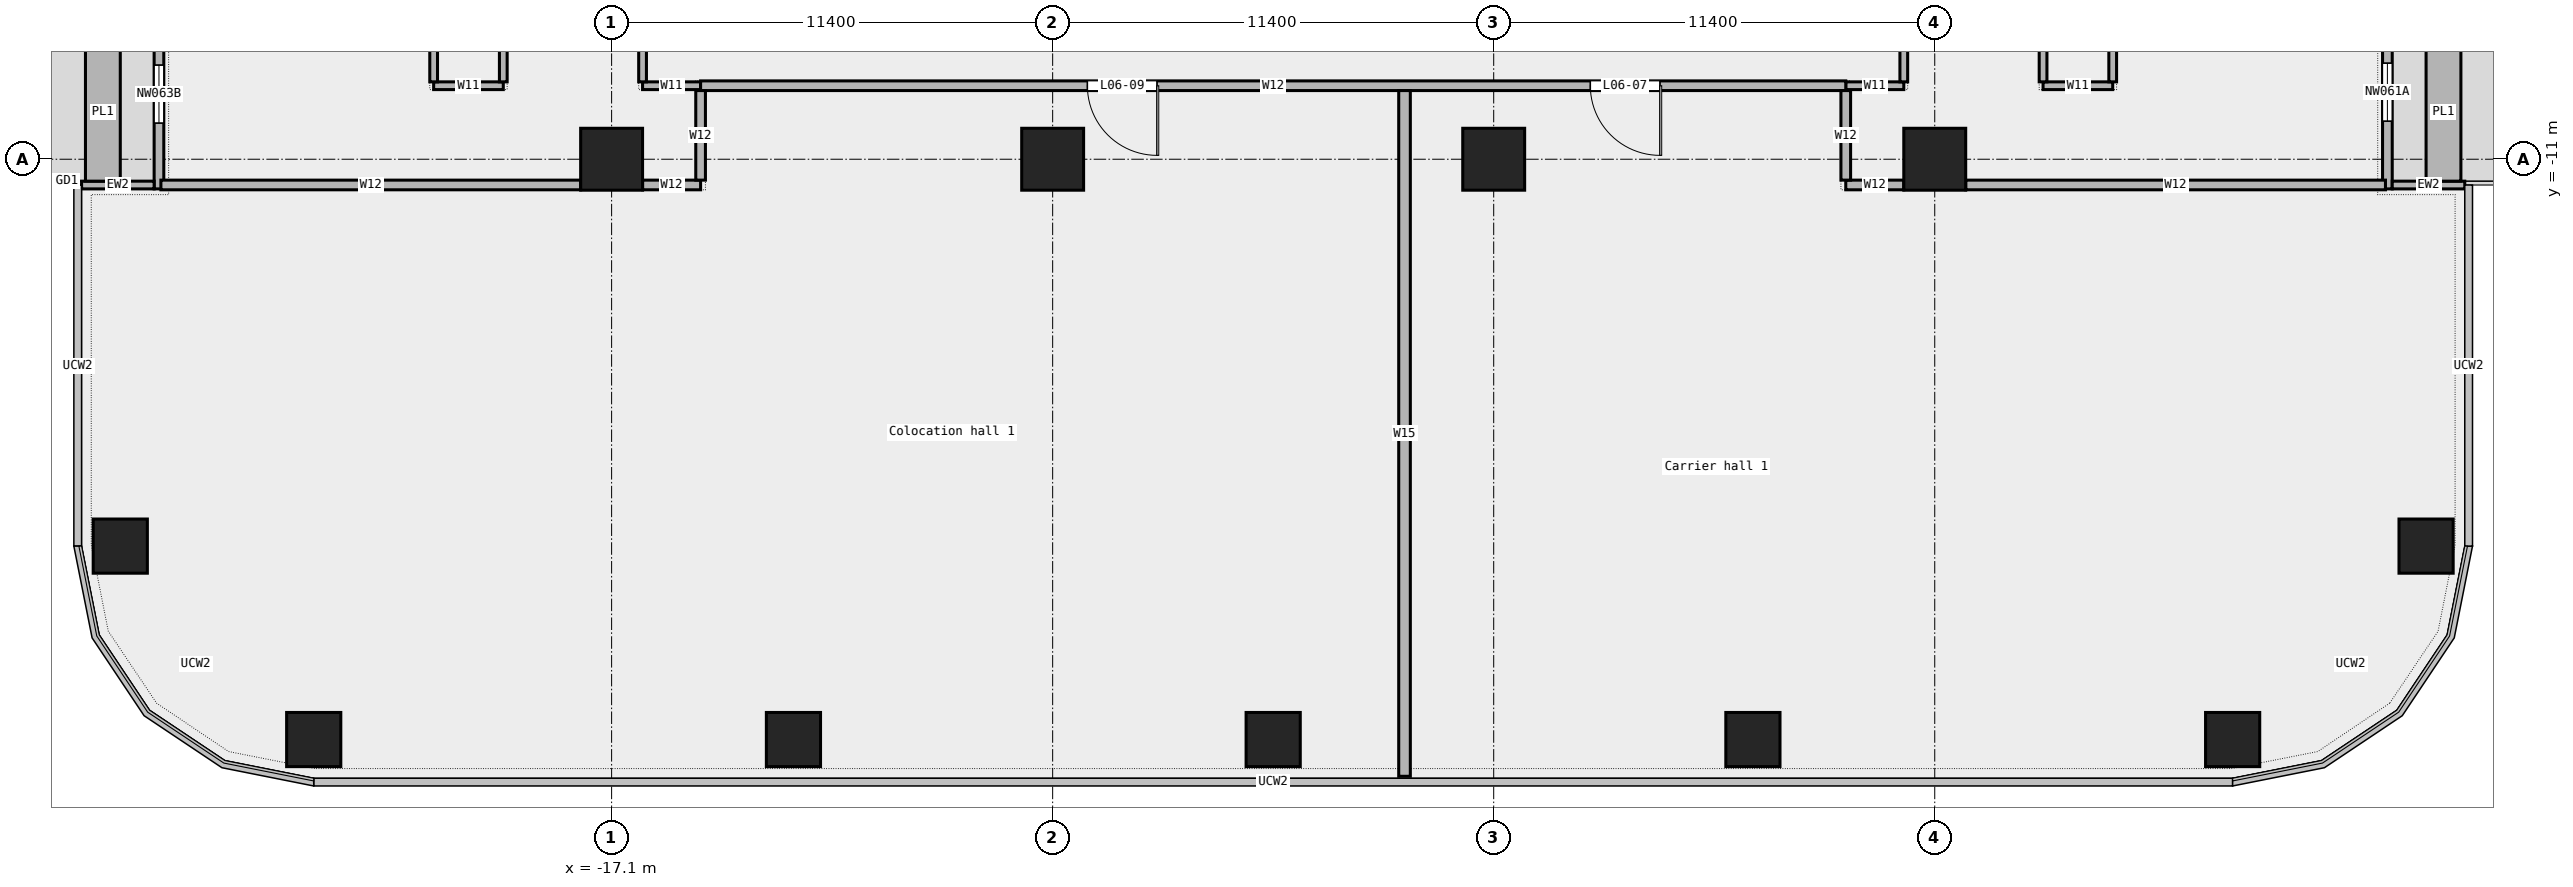
"""IFC4 building model, lengths in metres.
Left out: names, types, materials, properties, quantities, classifications, styles, units other than length and angle.
Written with IfcOpenShell. Run it as: python <this file> out.ifc"""

import sys

from ifc_helpers import new_model, si_unit, direction, frame, frame_2d, origin, origin_2d, place, context, subcontext, project, spatial, rectangle, extrude, element, fill, save


model = new_model("IFC4")
c1 = context("Model", 3, precision=1e-05, world=origin(), true_north=direction((0.0, 1.0)))
c2 = subcontext(c1, "Body", "Model", "MODEL_VIEW")
j1 = project(units=[si_unit("LENGTHUNIT", "METRE"), si_unit("PLANEANGLEUNIT", "RADIAN")], contexts=[c1])
p1 = place(None, origin())
s1 = spatial("IfcSite", under=j1, at=p1, CompositionType="ELEMENT")
p2 = place(p1, origin())
s2 = spatial("IfcBuilding", under=s1, at=p2, CompositionType="ELEMENT")
p3 = place(p2, frame((0.0, 0.0, 35.8)))
s3 = spatial("IfcBuildingStorey", under=s2, at=p3, CompositionType="ELEMENT", Elevation=35.8)
for number, where, z_axis, x_axis in (
    (1, (-24.8, -26.0, 0.0), (0.0, 0.0, 1.0), (1.0, 0.0, 0.0)),
    (2, (-12.4, -26.0, 0.0), (0.0, 0.0, 1.0), (1.0, 0.0, 0.0)),
    (3, (0.0, -26.0, 0.0), (0.0, 0.0, 1.0), (1.0, 0.0, 0.0)),
    (4, (12.4, -26.0, 0.0), (0.0, 0.0, 1.0), (1.0, 0.0, 0.0)),
    (5, (24.8, -26.0, 0.0), (0.0, 0.0, 1.0), (1.0, 0.0, 0.0)),
    (6, (29.8, -21.0, 0.0), (0.0, 0.0, 1.0), (1.0, 0.0, 0.0)),
    (7, (-29.8, -21.0, 0.0), (0.0, 0.0, 1.0), (1.0, 0.0, 0.0)),
):
    element("IfcColumn", number, at=place(p3, frame(where, z_axis=z_axis, x_axis=x_axis)), inside=s3, PredefinedType="COLUMN", context=c2, shape_type="SweptSolid", body=[
        extrude(rectangle(XDim=1.4, YDim=1.4, at=origin_2d()), origin(), (0.0, 0.0, 1.0), 4.35),
    ])
for number, where, z_axis, x_axis in (
    (8, (-17.1, -11.0, 0.0), (0.0, 0.0, 1.0), (1.0, 0.0, 0.0)),
    (9, (-5.7, -11.0, 0.0), (0.0, 0.0, 1.0), (1.0, 0.0, 0.0)),
    (10, (5.7, -11.0, 0.0), (0.0, 0.0, 1.0), (1.0, 0.0, 0.0)),
    (11, (17.1, -11.0, 0.0), (0.0, 0.0, 1.0), (1.0, 0.0, 0.0)),
):
    element("IfcColumn", number, at=place(p3, frame(where, z_axis=z_axis, x_axis=x_axis)), inside=s3, PredefinedType="COLUMN", context=c2, shape_type="SweptSolid", body=[
        extrude(rectangle(XDim=1.6, YDim=1.6, at=origin_2d()), origin(), (0.0, 0.0, 1.0), 4.35),
    ])
p4 = place(p3, frame((28.8, -11.767, 0.0), z_axis=(0.0, 0.0, 1.0), x_axis=(0.0, 1.0, 0.0)))
e12 = element("IfcWall", 12, at=p4, inside=s3, PredefinedType="STANDARD", context=c2, shape_type="SweptSolid", body=[
    extrude(rectangle(XDim=14.2, YDim=0.25, at=frame_2d((7.1, 0.0))), origin(), (0.0, 0.0, 1.0), 4.35),
])
p5 = place(p4, frame((1.75, 0.0, 0.45)))
e13 = element("IfcOpeningElement", 13, at=p5, cuts=e12, PredefinedType="OPENING", context=c2, shape_type="SweptSolid", body=[
    extrude(rectangle(XDim=1.5, YDim=3.0, at=frame_2d((0.75, 1.5))), frame((0.0, 0.137, 0.0), z_axis=(0.0, -1.0, 0.0), x_axis=(1.0, 0.0, 0.0)), (0.0, 0.0, 1.0), 0.274),
])
p6 = place(p4, frame((6.25, 0.0, 0.0)))
e14 = element("IfcOpeningElement", 14, at=p6, cuts=e12, PredefinedType="OPENING", context=c2, shape_type="SweptSolid", body=[
    extrude(rectangle(XDim=1.8, YDim=2.4, at=frame_2d((0.9, 1.2))), frame((0.0, 0.137, 0.0), z_axis=(0.0, -1.0, 0.0), x_axis=(1.0, 0.0, 0.0)), (0.0, 0.0, 1.0), 0.274),
])
p7 = place(p4, frame((11.0, 0.0, 0.45)))
e15 = element("IfcOpeningElement", 15, at=p7, cuts=e12, PredefinedType="OPENING", context=c2, shape_type="SweptSolid", body=[
    extrude(rectangle(XDim=1.5, YDim=3.0, at=frame_2d((0.75, 1.5))), frame((0.0, 0.137, 0.0), z_axis=(0.0, -1.0, 0.0), x_axis=(1.0, 0.0, 0.0)), (0.0, 0.0, 1.0), 0.274),
])
p8 = place(p3, frame((30.8, -11.667, 0.0), z_axis=(0.0, 0.0, 1.0), x_axis=(-1.0, 0.0, 0.0)))
e16 = element("IfcWall", 16, at=p8, inside=s3, PredefinedType="STANDARD", context=c2, shape_type="SweptSolid", body=[
    extrude(rectangle(XDim=1.875, YDim=0.2, at=frame_2d((0.938, 0.0))), origin(), (0.0, 0.0, 1.0), 4.35),
])
p9 = place(p3, frame((30.25, -11.567, 0.0), z_axis=(0.0, 0.0, 1.0), x_axis=(0.0, 1.0, 0.0)))
e17 = element("IfcWall", 17, at=p9, inside=s3, PredefinedType="STANDARD", context=c2, shape_type="SweptSolid", body=[
    extrude(rectangle(XDim=3.6, YDim=0.9, at=frame_2d((1.8, 0.0))), origin(), (0.0, 0.0, 1.0), 0.7),
])
p10 = place(p3, frame((-28.8, 2.433, 0.0), z_axis=(0.0, 0.0, 1.0), x_axis=(0.0, -1.0, 0.0)))
e18 = element("IfcWall", 18, at=p10, inside=s3, PredefinedType="STANDARD", context=c2, shape_type="SweptSolid", body=[
    extrude(rectangle(XDim=14.2, YDim=0.25, at=frame_2d((7.1, 0.0))), origin(), (0.0, 0.0, 1.0), 4.35),
])
p11 = place(p10, frame((1.75, 0.0, 0.45)))
e19 = element("IfcOpeningElement", 19, at=p11, cuts=e18, PredefinedType="OPENING", context=c2, shape_type="SweptSolid", body=[
    extrude(rectangle(XDim=1.5, YDim=3.0, at=frame_2d((0.75, 1.5))), frame((0.0, 0.137, 0.0), z_axis=(0.0, -1.0, 0.0), x_axis=(1.0, 0.0, 0.0)), (0.0, 0.0, 1.0), 0.274),
])
p12 = place(p10, frame((6.25, 0.0, 0.0)))
e20 = element("IfcOpeningElement", 20, at=p12, cuts=e18, PredefinedType="OPENING", context=c2, shape_type="SweptSolid", body=[
    extrude(rectangle(XDim=1.8, YDim=2.4, at=frame_2d((0.9, 1.2))), frame((0.0, 0.137, 0.0), z_axis=(0.0, -1.0, 0.0), x_axis=(1.0, 0.0, 0.0)), (0.0, 0.0, 1.0), 0.274),
])
p13 = place(p10, frame((11.0, 0.0, 0.45)))
e21 = element("IfcOpeningElement", 21, at=p13, cuts=e18, PredefinedType="OPENING", context=c2, shape_type="SweptSolid", body=[
    extrude(rectangle(XDim=1.5, YDim=3.0, at=frame_2d((0.75, 1.5))), frame((0.0, 0.137, 0.0), z_axis=(0.0, -1.0, 0.0), x_axis=(1.0, 0.0, 0.0)), (0.0, 0.0, 1.0), 0.274),
])
p14 = place(p3, frame((-30.8, -11.667, 0.0), z_axis=(0.0, 0.0, 1.0), x_axis=(1.0, 0.0, 0.0)))
e22 = element("IfcWall", 22, at=p14, inside=s3, PredefinedType="STANDARD", context=c2, shape_type="SweptSolid", body=[
    extrude(rectangle(XDim=1.875, YDim=0.2, at=frame_2d((0.938, 0.0))), origin(), (0.0, 0.0, 1.0), 4.35),
])
p15 = place(p3, frame((-30.25, -7.967, 0.0), z_axis=(0.0, 0.0, 1.0), x_axis=(0.0, -1.0, 0.0)))
e23 = element("IfcWall", 23, at=p15, inside=s3, PredefinedType="STANDARD", context=c2, shape_type="SweptSolid", body=[
    extrude(rectangle(XDim=3.6, YDim=0.9, at=frame_2d((1.8, 0.0))), origin(), (0.0, 0.0, 1.0), 0.7),
])
p16 = place(p3, frame((-28.75, -11.665, 0.0), z_axis=(0.0, 0.0, 1.0), x_axis=(1.0, 0.0, 0.0)))
e24 = element("IfcWall", 24, at=p16, inside=s3, PredefinedType="PARTITIONING", context=c2, shape_type="SweptSolid", body=[
    extrude(rectangle(XDim=10.85, YDim=0.25, at=frame_2d((5.425, 0.0))), origin(), (0.0, 0.0, 1.0), 4.35),
])
for number, where, z_axis, x_axis in (
    (25, (-16.3, -11.665, 0.0), (0.0, 0.0, 1.0), (1.0, 0.0, 0.0)),
    (26, (14.8, -11.665, 0.0), (0.0, 0.0, 1.0), (1.0, 0.0, 0.0)),
):
    element("IfcWall", number, at=place(p3, frame(where, z_axis=z_axis, x_axis=x_axis)), inside=s3, PredefinedType="PARTITIONING", context=c2, shape_type="SweptSolid", body=[
        extrude(rectangle(XDim=1.5, YDim=0.25, at=frame_2d((0.75, 0.0))), origin(), (0.0, 0.0, 1.0), 4.35),
    ])
p17 = place(p3, frame((17.9, -11.665, 0.0), z_axis=(0.0, 0.0, 1.0), x_axis=(1.0, 0.0, 0.0)))
e27 = element("IfcWall", 27, at=p17, inside=s3, PredefinedType="PARTITIONING", context=c2, shape_type="SweptSolid", body=[
    extrude(rectangle(XDim=10.85, YDim=0.25, at=frame_2d((5.425, 0.0))), origin(), (0.0, 0.0, 1.0), 4.35),
])
p18 = place(p3, frame((-21.7, -9.1, 0.0), z_axis=(0.0, 0.0, 1.0), x_axis=(1.0, 0.0, 0.0)))
e28 = element("IfcWall", 28, at=p18, inside=s3, PredefinedType="PARTITIONING", context=c2, shape_type="SweptSolid", body=[
    extrude(rectangle(XDim=1.8, YDim=0.2, at=frame_2d((0.9, 0.0))), origin(), (0.0, 0.0, 1.0), 4.35),
])
for number, where, z_axis, x_axis in (
    (29, (-16.3, -9.1, 0.0), (0.0, 0.0, 1.0), (1.0, 0.0, 0.0)),
    (30, (14.8, -9.1, 0.0), (0.0, 0.0, 1.0), (1.0, 0.0, 0.0)),
):
    element("IfcWall", number, at=place(p3, frame(where, z_axis=z_axis, x_axis=x_axis)), inside=s3, PredefinedType="PARTITIONING", context=c2, shape_type="SweptSolid", body=[
        extrude(rectangle(XDim=1.5, YDim=0.2, at=frame_2d((0.75, 0.0))), origin(), (0.0, 0.0, 1.0), 4.35),
    ])
p19 = place(p3, frame((19.9, -9.1, 0.0), z_axis=(0.0, 0.0, 1.0), x_axis=(1.0, 0.0, 0.0)))
e31 = element("IfcWall", 31, at=p19, inside=s3, PredefinedType="PARTITIONING", context=c2, shape_type="SweptSolid", body=[
    extrude(rectangle(XDim=1.8, YDim=0.2, at=frame_2d((0.9, 0.0))), origin(), (0.0, 0.0, 1.0), 4.35),
])
p20 = place(p3, frame((-14.8, -9.1, 0.0), z_axis=(0.0, 0.0, 1.0), x_axis=(1.0, 0.0, 0.0)))
e32 = element("IfcWall", 32, at=p20, inside=s3, PredefinedType="PARTITIONING", context=c2, shape_type="SweptSolid", body=[
    extrude(rectangle(XDim=29.6, YDim=0.25, at=frame_2d((14.8, 0.0))), origin(), (0.0, 0.0, 1.0), 4.35),
])
p21 = place(p20, frame((22.998, 0.0, 0.0)))
e33 = element("IfcOpeningElement", 33, at=p21, cuts=e32, PredefinedType="OPENING", context=c2, shape_type="SweptSolid", body=[
    extrude(rectangle(XDim=1.8, YDim=2.1, at=frame_2d((0.9, 1.05))), frame((0.0, 0.137, 0.0), z_axis=(0.0, -1.0, 0.0), x_axis=(1.0, 0.0, 0.0)), (0.0, 0.0, 1.0), 0.274),
])
p22 = place(p20, frame((9.998, 0.0, 0.0)))
e34 = element("IfcOpeningElement", 34, at=p22, cuts=e32, PredefinedType="OPENING", context=c2, shape_type="SweptSolid", body=[
    extrude(rectangle(XDim=1.8, YDim=2.1, at=frame_2d((0.9, 1.05))), frame((0.0, 0.137, 0.0), z_axis=(0.0, -1.0, 0.0), x_axis=(1.0, 0.0, 0.0)), (0.0, 0.0, 1.0), 0.274),
])
p23 = place(p3, frame((-21.7, -9.0, 0.0), z_axis=(0.0, 0.0, 1.0), x_axis=(0.0, 1.0, 0.0)))
e35 = element("IfcWall", 35, at=p23, inside=s3, PredefinedType="PARTITIONING", context=c2, shape_type="SweptSolid", body=[
    extrude(rectangle(XDim=11.21, YDim=0.2, at=frame_2d((5.605, 0.0))), origin(), (0.0, 0.0, 1.0), 4.35),
])
p24 = place(p23, frame((4.705, 0.0, 0.0)))
e36 = element("IfcOpeningElement", 36, at=p24, cuts=e35, PredefinedType="OPENING", context=c2, shape_type="SweptSolid", body=[
    extrude(rectangle(XDim=1.8, YDim=2.1, at=frame_2d((0.9, 1.05))), frame((0.0, 0.112, 0.0), z_axis=(0.0, -1.0, 0.0), x_axis=(1.0, 0.0, 0.0)), (0.0, 0.0, 1.0), 0.224),
])
p25 = place(p3, frame((-19.9, -9.0, 0.0), z_axis=(0.0, 0.0, 1.0), x_axis=(0.0, 1.0, 0.0)))
e37 = element("IfcWall", 37, at=p25, inside=s3, PredefinedType="PARTITIONING", context=c2, shape_type="SweptSolid", body=[
    extrude(rectangle(XDim=11.15, YDim=0.2, at=frame_2d((5.575, 0.0))), origin(), (0.0, 0.0, 1.0), 4.35),
])
p26 = place(p3, frame((-16.3, -9.0, 0.0), z_axis=(0.0, 0.0, 1.0), x_axis=(0.0, 1.0, 0.0)))
e38 = element("IfcWall", 38, at=p26, inside=s3, PredefinedType="PARTITIONING", context=c2, shape_type="SweptSolid", body=[
    extrude(rectangle(XDim=8.2, YDim=0.2, at=frame_2d((4.1, 0.0))), origin(), (0.0, 0.0, 1.0), 4.35),
])
p27 = place(p3, frame((-14.8, -11.54, 0.0), z_axis=(0.0, 0.0, 1.0), x_axis=(0.0, 1.0, 0.0)))
e39 = element("IfcWall", 39, at=p27, inside=s3, PredefinedType="PARTITIONING", context=c2, shape_type="SweptSolid", body=[
    extrude(rectangle(XDim=2.315, YDim=0.25, at=frame_2d((1.157, 0.0))), origin(), (0.0, 0.0, 1.0), 4.35),
])
p28 = place(p3, frame((3.395, -26.95, 0.0), z_axis=(0.0, 0.0, 1.0), x_axis=(0.0, 1.0, 0.0)))
e40 = element("IfcWall", 40, at=p28, inside=s3, PredefinedType="PARTITIONING", context=c2, shape_type="SweptSolid", body=[
    extrude(rectangle(XDim=17.725, YDim=0.3, at=frame_2d((8.862, 0.0))), origin(), (0.0, 0.0, 1.0), 4.35),
])
p29 = place(p3, frame((14.8, -11.54, 0.0), z_axis=(0.0, 0.0, 1.0), x_axis=(0.0, 1.0, 0.0)))
e41 = element("IfcWall", 41, at=p29, inside=s3, PredefinedType="PARTITIONING", context=c2, shape_type="SweptSolid", body=[
    extrude(rectangle(XDim=2.315, YDim=0.25, at=frame_2d((1.157, 0.0))), origin(), (0.0, 0.0, 1.0), 4.35),
])
p30 = place(p3, frame((16.3, -9.0, 0.0), z_axis=(0.0, 0.0, 1.0), x_axis=(0.0, 1.0, 0.0)))
e42 = element("IfcWall", 42, at=p30, inside=s3, PredefinedType="PARTITIONING", context=c2, shape_type="SweptSolid", body=[
    extrude(rectangle(XDim=8.2, YDim=0.2, at=frame_2d((4.1, 0.0))), origin(), (0.0, 0.0, 1.0), 4.35),
])
p31 = place(p3, frame((19.9, -9.0, 0.0), z_axis=(0.0, 0.0, 1.0), x_axis=(0.0, 1.0, 0.0)))
e43 = element("IfcWall", 43, at=p31, inside=s3, PredefinedType="PARTITIONING", context=c2, shape_type="SweptSolid", body=[
    extrude(rectangle(XDim=9.925, YDim=0.2, at=frame_2d((4.962, 0.0))), origin(), (0.0, 0.0, 1.0), 4.35),
])
p32 = place(p3, frame((21.7, -9.0, 0.0), z_axis=(0.0, 0.0, 1.0), x_axis=(0.0, 1.0, 0.0)))
e44 = element("IfcWall", 44, at=p32, inside=s3, PredefinedType="PARTITIONING", context=c2, shape_type="SweptSolid", body=[
    extrude(rectangle(XDim=24.275, YDim=0.2, at=frame_2d((12.137, 0.0))), origin(), (0.0, 0.0, 1.0), 4.35),
])
p33 = place(p32, frame((4.768, 0.0, 0.0)))
e45 = element("IfcOpeningElement", 45, at=p33, cuts=e44, PredefinedType="OPENING", context=c2, shape_type="SweptSolid", body=[
    extrude(rectangle(XDim=1.8, YDim=2.1, at=frame_2d((0.9, 1.05))), frame((0.0, 0.112, 0.0), z_axis=(0.0, -1.0, 0.0), x_axis=(1.0, 0.0, 0.0)), (0.0, 0.0, 1.0), 0.224),
])
p34 = place(p32, frame((17.055, 0.0, 0.0)))
e46 = element("IfcOpeningElement", 46, at=p34, cuts=e44, PredefinedType="OPENING", context=c2, shape_type="SweptSolid", body=[
    extrude(rectangle(XDim=1.5, YDim=2.1, at=frame_2d((0.75, 1.05))), frame((0.0, 0.112, 0.0), z_axis=(0.0, -1.0, 0.0), x_axis=(1.0, 0.0, 0.0)), (0.0, 0.0, 1.0), 0.224),
])
p35 = place(p5, origin())
e47 = element("IfcWindow", 47, at=p35, inside=s3, PartitioningType="SINGLE_PANEL", PredefinedType="WINDOW", context=c2, shape_type="SweptSolid", body=[
    extrude(rectangle(XDim=1.5, YDim=3.0, at=frame_2d((0.75, 1.5))), frame((0.0, 0.03, 0.0), z_axis=(0.0, -1.0, 0.0), x_axis=(1.0, 0.0, 0.0)), (0.0, 0.0, 1.0), 0.06),
])
fill(e13, e47)
p36 = place(p13, origin())
e48 = element("IfcWindow", 48, at=p36, inside=s3, PartitioningType="SINGLE_PANEL", PredefinedType="WINDOW", context=c2, shape_type="SweptSolid", body=[
    extrude(rectangle(XDim=1.5, YDim=3.0, at=frame_2d((0.75, 1.5))), frame((0.0, 0.03, 0.0), z_axis=(0.0, -1.0, 0.0), x_axis=(1.0, 0.0, 0.0)), (0.0, 0.0, 1.0), 0.06),
])
fill(e21, e48)
p37 = place(p21, origin())
e49 = element("IfcDoor", 49, at=p37, inside=s3, OperationType="DOUBLE_DOOR_SINGLE_SWING", PredefinedType="DOOR", context=c2, shape_type="SweptSolid", body=[
    extrude(rectangle(XDim=1.8, YDim=2.1, at=frame_2d((0.9, 1.05))), frame((0.0, 0.025, 0.0), z_axis=(0.0, -1.0, 0.0), x_axis=(1.0, 0.0, 0.0)), (0.0, 0.0, 1.0), 0.05),
])
fill(e33, e49)
p38 = place(p22, origin())
e50 = element("IfcDoor", 50, at=p38, inside=s3, OperationType="DOUBLE_DOOR_SINGLE_SWING", PredefinedType="DOOR", context=c2, shape_type="SweptSolid", body=[
    extrude(rectangle(XDim=1.8, YDim=2.1, at=frame_2d((0.9, 1.05))), frame((0.0, 0.025, 0.0), z_axis=(0.0, -1.0, 0.0), x_axis=(1.0, 0.0, 0.0)), (0.0, 0.0, 1.0), 0.05),
])
fill(e34, e50)
save(model, sys.argv[1])
